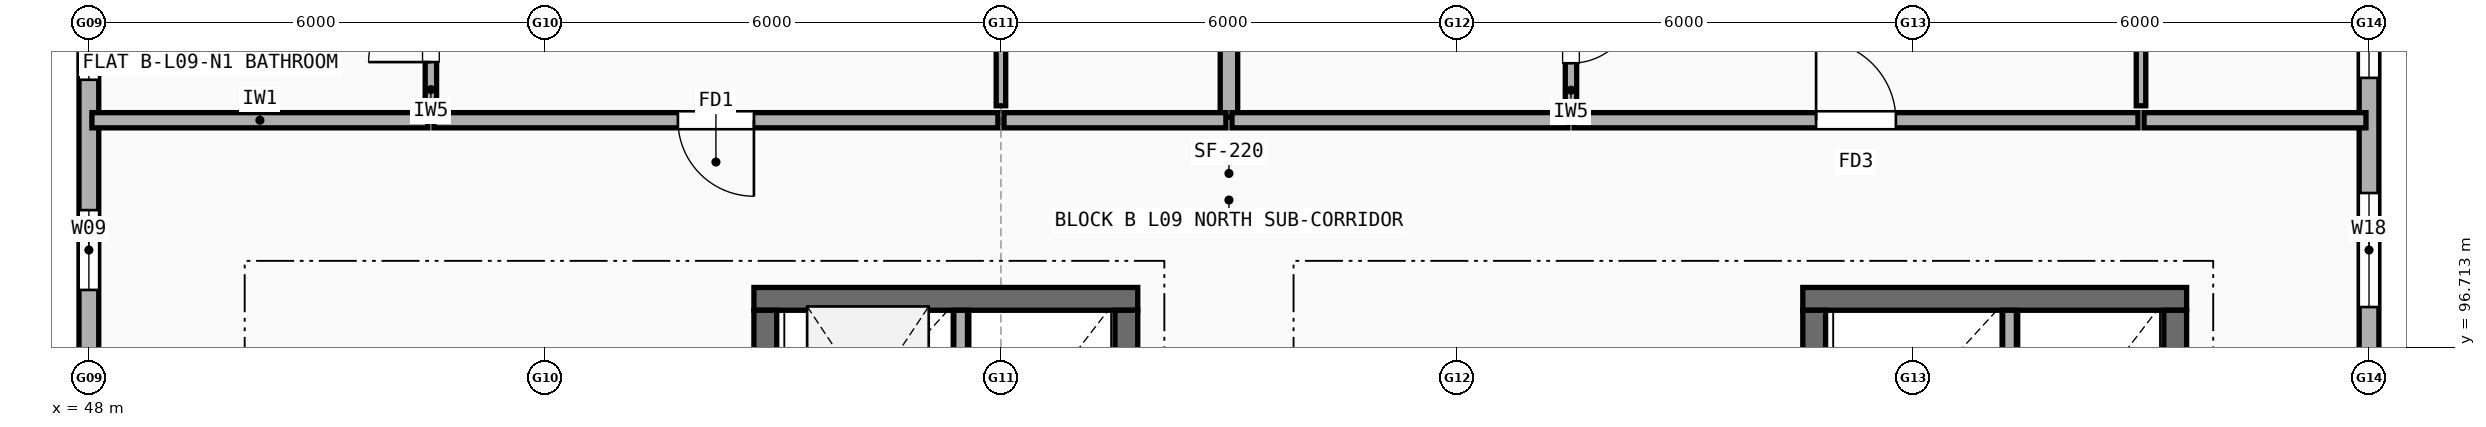
"""IFC4 building model, lengths in metres.
Left out: names, types, materials, properties, quantities, classifications, styles, units other than length and angle.
Written with IfcOpenShell. Run it as: python <this file> out.ifc"""

import sys

from ifc_helpers import new_model, si_unit, direction, frame, frame_2d, origin, place, context, subcontext, project, spatial, rectangle, extrude, element, fill, save


model = new_model("IFC4")
c1 = context("Model", 3, precision=1e-05, world=origin(), true_north=direction((0.0, 1.0)))
c2 = subcontext(c1, "Body", "Model", "MODEL_VIEW")
j1 = project(units=[si_unit("LENGTHUNIT", "METRE"), si_unit("PLANEANGLEUNIT", "RADIAN")], contexts=[c1])
p1 = place(None, origin())
s1 = spatial("IfcSite", under=j1, at=p1, CompositionType="ELEMENT")
p2 = place(p1, origin())
s2 = spatial("IfcBuilding", under=s1, at=p2, CompositionType="ELEMENT")
p3 = place(p2, frame((0.0, 0.0, 30.1)))
s3 = spatial("IfcBuildingStorey", under=s2, at=p3, CompositionType="ELEMENT", Elevation=30.1)
p4 = place(p3, frame((78.0, 96.325, 0.0), z_axis=(0.0, 0.0, 1.0), x_axis=(0.0, 1.0, 0.0)))
e1 = element("IfcWall", 1, at=p4, inside=s3, PredefinedType="STANDARD", context=c2, shape_type="SweptSolid", body=[
    extrude(rectangle(XDim=5.35, YDim=0.26, at=frame_2d((2.675, 0.0))), origin(), (0.0, 0.0, 1.0), 2.467),
])
p5 = place(p4, frame((0.917, 0.0, 0.9)))
e2 = element("IfcOpeningElement", 2, at=p5, cuts=e1, PredefinedType="OPENING", context=c2, shape_type="SweptSolid", body=[
    extrude(rectangle(XDim=1.5, YDim=1.4, at=frame_2d((0.75, 0.7))), frame((0.0, 0.14, 0.0), z_axis=(0.0, -1.0, 0.0), x_axis=(1.0, 0.0, 0.0)), (0.0, 0.0, 1.0), 0.28),
])
p6 = place(p4, frame((3.933, 0.0, 0.9)))
e3 = element("IfcOpeningElement", 3, at=p6, cuts=e1, PredefinedType="OPENING", context=c2, shape_type="SweptSolid", body=[
    extrude(rectangle(XDim=0.9, YDim=1.3, at=frame_2d((0.45, 0.65))), frame((0.0, 0.14, 0.0), z_axis=(0.0, -1.0, 0.0), x_axis=(1.0, 0.0, 0.0)), (0.0, 0.0, 1.0), 0.28),
])
p7 = place(p3, frame((48.0, 101.675, 0.0), z_axis=(0.0, 0.0, 1.0), x_axis=(0.0, -1.0, 0.0)))
e4 = element("IfcWall", 4, at=p7, inside=s3, PredefinedType="STANDARD", context=c2, shape_type="SweptSolid", body=[
    extrude(rectangle(XDim=5.35, YDim=0.26, at=frame_2d((2.675, 0.0))), origin(), (0.0, 0.0, 1.0), 2.467),
])
p8 = place(p7, frame((0.492, 0.0, 0.9)))
e5 = element("IfcOpeningElement", 5, at=p8, cuts=e4, PredefinedType="OPENING", context=c2, shape_type="SweptSolid", body=[
    extrude(rectangle(XDim=0.95, YDim=1.35, at=frame_2d((0.475, 0.675))), frame((0.0, 0.14, 0.0), z_axis=(0.0, -1.0, 0.0), x_axis=(1.0, 0.0, 0.0)), (0.0, 0.0, 1.0), 0.28),
])
p9 = place(p7, frame((3.157, 0.0, 0.9)))
e6 = element("IfcOpeningElement", 6, at=p9, cuts=e4, PredefinedType="OPENING", context=c2, shape_type="SweptSolid", body=[
    extrude(rectangle(XDim=1.05, YDim=1.35, at=frame_2d((0.525, 0.675))), frame((0.0, 0.14, 0.0), z_axis=(0.0, -1.0, 0.0), x_axis=(1.0, 0.0, 0.0)), (0.0, 0.0, 1.0), 0.28),
])
p10 = place(p3, frame((61.8, 97.35, 0.0), z_axis=(0.0, 0.0, 1.0), x_axis=(-1.0, 0.0, 0.0)))
e7 = element("IfcWall", 7, at=p10, inside=s3, PredefinedType="SHEAR", context=c2, shape_type="SweptSolid", body=[
    extrude(rectangle(XDim=5.05, YDim=0.3, at=frame_2d((2.525, 0.0))), origin(), (0.0, 0.0, 1.0), 2.985),
])
p11 = place(p3, frame((61.65, 90.75, 0.0), z_axis=(0.0, 0.0, 1.0), x_axis=(0.0, 1.0, 0.0)))
e8 = element("IfcWall", 8, at=p11, inside=s3, PredefinedType="SHEAR", context=c2, shape_type="SweptSolid", body=[
    extrude(rectangle(XDim=6.45, YDim=0.3, at=frame_2d((3.225, 0.0))), origin(), (0.0, 0.0, 1.0), 2.985),
])
p12 = place(p3, frame((56.9, 93.75, 0.0), z_axis=(0.0, 0.0, 1.0), x_axis=(0.0, 1.0, 0.0)))
e9 = element("IfcWall", 9, at=p12, inside=s3, PredefinedType="SHEAR", context=c2, shape_type="SweptSolid", body=[
    extrude(rectangle(XDim=3.45, YDim=0.3, at=frame_2d((1.725, 0.0))), origin(), (0.0, 0.0, 1.0), 2.985),
])
p13 = place(p3, frame((59.47, 94.94, 0.0), z_axis=(0.0, 0.0, 1.0), x_axis=(0.0, 1.0, 0.0)))
e10 = element("IfcWall", 10, at=p13, inside=s3, PredefinedType="SOLIDWALL", context=c2, shape_type="SweptSolid", body=[
    extrude(rectangle(XDim=2.26, YDim=0.18, at=frame_2d((1.13, 0.0))), origin(), (0.0, 0.0, 1.0), 2.985),
])
p14 = place(p3, frame((75.6, 97.35, 0.0), z_axis=(0.0, 0.0, 1.0), x_axis=(-1.0, 0.0, 0.0)))
e11 = element("IfcWall", 11, at=p14, inside=s3, PredefinedType="SHEAR", context=c2, shape_type="SweptSolid", body=[
    extrude(rectangle(XDim=5.05, YDim=0.3, at=frame_2d((2.525, 0.0))), origin(), (0.0, 0.0, 1.0), 2.985),
])
p15 = place(p3, frame((75.45, 90.75, 0.0), z_axis=(0.0, 0.0, 1.0), x_axis=(0.0, 1.0, 0.0)))
e12 = element("IfcWall", 12, at=p15, inside=s3, PredefinedType="SHEAR", context=c2, shape_type="SweptSolid", body=[
    extrude(rectangle(XDim=6.45, YDim=0.3, at=frame_2d((3.225, 0.0))), origin(), (0.0, 0.0, 1.0), 2.985),
])
p16 = place(p3, frame((70.7, 93.65, 0.0), z_axis=(0.0, 0.0, 1.0), x_axis=(0.0, 1.0, 0.0)))
e13 = element("IfcWall", 13, at=p16, inside=s3, PredefinedType="SHEAR", context=c2, shape_type="SweptSolid", body=[
    extrude(rectangle(XDim=3.55, YDim=0.3, at=frame_2d((1.775, 0.0))), origin(), (0.0, 0.0, 1.0), 2.985),
])
p17 = place(p3, frame((73.27, 94.94, 0.0), z_axis=(0.0, 0.0, 1.0), x_axis=(0.0, 1.0, 0.0)))
e14 = element("IfcWall", 14, at=p17, inside=s3, PredefinedType="SOLIDWALL", context=c2, shape_type="SweptSolid", body=[
    extrude(rectangle(XDim=2.26, YDim=0.18, at=frame_2d((1.13, 0.0))), origin(), (0.0, 0.0, 1.0), 2.985),
])
p18 = place(p3, frame((63.0, 99.74, 0.0), z_axis=(0.0, 0.0, 1.0), x_axis=(0.0, 1.0, 0.0)))
e15 = element("IfcWall", 15, at=p18, inside=s3, PredefinedType="SOLIDWALL", context=c2, shape_type="SweptSolid", body=[
    extrude(rectangle(XDim=13.87, YDim=0.23, at=frame_2d((6.935, 0.0))), origin(), (0.0, 0.0, 1.0), 2.467),
])
p19 = place(p3, frame((48.04, 99.7, 0.0), z_axis=(0.0, 0.0, 1.0), x_axis=(1.0, 0.0, 0.0)))
e16 = element("IfcWall", 16, at=p19, inside=s3, PredefinedType="SOLIDWALL", context=c2, shape_type="SweptSolid", body=[
    extrude(rectangle(XDim=4.42, YDim=0.2, at=frame_2d((2.21, 0.0))), origin(), (0.0, 0.0, 1.0), 2.467),
])
p20 = place(p3, frame((52.54, 99.7, 0.0), z_axis=(0.0, 0.0, 1.0), x_axis=(1.0, 0.0, 0.0)))
e17 = element("IfcWall", 17, at=p20, inside=s3, PredefinedType="SOLIDWALL", context=c2, shape_type="SweptSolid", body=[
    extrude(rectangle(XDim=7.42, YDim=0.2, at=frame_2d((3.71, 0.0))), origin(), (0.0, 0.0, 1.0), 2.508),
])
p21 = place(p20, frame((3.21, 0.0, 0.0)))
e18 = element("IfcOpeningElement", 18, at=p21, cuts=e17, PredefinedType="OPENING", context=c2, shape_type="SweptSolid", body=[
    extrude(rectangle(XDim=1.0, YDim=2.15, at=frame_2d((0.5, 1.075))), frame((0.0, 0.11, 0.0), z_axis=(0.0, -1.0, 0.0), x_axis=(1.0, 0.0, 0.0)), (0.0, 0.0, 1.0), 0.22),
])
p22 = place(p3, frame((52.5, 99.89, 0.0), z_axis=(0.0, 0.0, 1.0), x_axis=(0.0, 1.0, 0.0)))
e19 = element("IfcWall", 19, at=p22, inside=s3, PredefinedType="PARTITIONING", context=c2, shape_type="SweptSolid", body=[
    extrude(rectangle(XDim=1.97, YDim=0.15, at=frame_2d((0.985, 0.0))), origin(), (0.0, 0.0, 1.0), 2.985),
])
p23 = place(p22, frame((0.575, 0.0, 0.0)))
e20 = element("IfcOpeningElement", 20, at=p23, cuts=e19, PredefinedType="OPENING", context=c2, shape_type="SweptSolid", body=[
    extrude(rectangle(XDim=0.82, YDim=2.08, at=frame_2d((0.41, 1.04))), frame((0.0, 0.085, 0.0), z_axis=(0.0, -1.0, 0.0), x_axis=(1.0, 0.0, 0.0)), (0.0, 0.0, 1.0), 0.17),
])
p24 = place(p3, frame((60.04, 99.7, 0.0), z_axis=(0.0, 0.0, 1.0), x_axis=(1.0, 0.0, 0.0)))
e21 = element("IfcWall", 21, at=p24, inside=s3, PredefinedType="SOLIDWALL", context=c2, shape_type="SweptSolid", body=[
    extrude(rectangle(XDim=2.92, YDim=0.2, at=frame_2d((1.46, 0.0))), origin(), (0.0, 0.0, 1.0), 2.508),
])
p25 = place(p3, frame((60.0, 99.89, 0.0), z_axis=(0.0, 0.0, 1.0), x_axis=(0.0, 1.0, 0.0)))
e22 = element("IfcWall", 22, at=p25, inside=s3, PredefinedType="PARTITIONING", context=c2, shape_type="SweptSolid", body=[
    extrude(rectangle(XDim=13.6, YDim=0.125, at=frame_2d((6.8, 0.0))), origin(), (0.0, 0.0, 1.0), 2.508),
])
p26 = place(p25, frame((6.65, 0.0, 0.0)))
e23 = element("IfcOpeningElement", 23, at=p26, cuts=e22, PredefinedType="OPENING", context=c2, shape_type="SweptSolid", body=[
    extrude(rectangle(XDim=0.9, YDim=2.1, at=frame_2d((0.45, 1.05))), frame((0.0, 0.073, 0.0), z_axis=(0.0, -1.0, 0.0), x_axis=(1.0, 0.0, 0.0)), (0.0, 0.0, 1.0), 0.145),
])
p27 = place(p3, frame((63.04, 99.7, 0.0), z_axis=(0.0, 0.0, 1.0), x_axis=(1.0, 0.0, 0.0)))
e24 = element("IfcWall", 24, at=p27, inside=s3, PredefinedType="SOLIDWALL", context=c2, shape_type="SweptSolid", body=[
    extrude(rectangle(XDim=4.42, YDim=0.2, at=frame_2d((2.21, 0.0))), origin(), (0.0, 0.0, 1.0), 2.985),
])
p28 = place(p3, frame((67.54, 99.7, 0.0), z_axis=(0.0, 0.0, 1.0), x_axis=(1.0, 0.0, 0.0)))
e25 = element("IfcWall", 25, at=p28, inside=s3, PredefinedType="SOLIDWALL", context=c2, shape_type="SweptSolid", body=[
    extrude(rectangle(XDim=7.42, YDim=0.2, at=frame_2d((3.71, 0.0))), origin(), (0.0, 0.0, 1.0), 2.985),
])
p29 = place(p28, frame((3.185, 0.0, 0.0)))
e26 = element("IfcOpeningElement", 26, at=p29, cuts=e25, PredefinedType="OPENING", context=c2, shape_type="SweptSolid", body=[
    extrude(rectangle(XDim=1.05, YDim=2.15, at=frame_2d((0.525, 1.075))), frame((0.0, 0.11, 0.0), z_axis=(0.0, -1.0, 0.0), x_axis=(1.0, 0.0, 0.0)), (0.0, 0.0, 1.0), 0.22),
])
p30 = place(p3, frame((67.5, 99.89, 0.0), z_axis=(0.0, 0.0, 1.0), x_axis=(0.0, 1.0, 0.0)))
e27 = element("IfcWall", 27, at=p30, inside=s3, PredefinedType="PARTITIONING", context=c2, shape_type="SweptSolid", body=[
    extrude(rectangle(XDim=1.97, YDim=0.15, at=frame_2d((0.985, 0.0))), origin(), (0.0, 0.0, 1.0), 2.985),
])
p31 = place(p30, frame((0.56, 0.0, 0.0)))
e28 = element("IfcOpeningElement", 28, at=p31, cuts=e27, PredefinedType="OPENING", context=c2, shape_type="SweptSolid", body=[
    extrude(rectangle(XDim=0.85, YDim=2.1, at=frame_2d((0.425, 1.05))), frame((0.0, 0.085, 0.0), z_axis=(0.0, -1.0, 0.0), x_axis=(1.0, 0.0, 0.0)), (0.0, 0.0, 1.0), 0.17),
])
p32 = place(p3, frame((75.04, 99.7, 0.0), z_axis=(0.0, 0.0, 1.0), x_axis=(1.0, 0.0, 0.0)))
e29 = element("IfcWall", 29, at=p32, inside=s3, PredefinedType="SOLIDWALL", context=c2, shape_type="SweptSolid", body=[
    extrude(rectangle(XDim=2.92, YDim=0.2, at=frame_2d((1.46, 0.0))), origin(), (0.0, 0.0, 1.0), 2.467),
])
p33 = place(p3, frame((75.0, 99.89, 0.0), z_axis=(0.0, 0.0, 1.0), x_axis=(0.0, 1.0, 0.0)))
e30 = element("IfcWall", 30, at=p33, inside=s3, PredefinedType="PARTITIONING", context=c2, shape_type="SweptSolid", body=[
    extrude(rectangle(XDim=13.92, YDim=0.125, at=frame_2d((6.96, 0.0))), origin(), (0.0, 0.0, 1.0), 2.467),
])
p34 = place(p33, frame((6.65, 0.0, 0.0)))
e31 = element("IfcOpeningElement", 31, at=p34, cuts=e30, PredefinedType="OPENING", context=c2, shape_type="SweptSolid", body=[
    extrude(rectangle(XDim=0.88, YDim=2.1, at=frame_2d((0.44, 1.05))), frame((0.0, 0.073, 0.0), z_axis=(0.0, -1.0, 0.0), x_axis=(1.0, 0.0, 0.0)), (0.0, 0.0, 1.0), 0.145),
])
p35 = place(p5, origin())
e32 = element("IfcWindow", 32, at=p35, inside=s3, PartitioningType="SINGLE_PANEL", PredefinedType="WINDOW", context=c2, shape_type="SweptSolid", body=[
    extrude(rectangle(XDim=1.5, YDim=1.4, at=frame_2d((0.75, 0.7))), frame((0.0, 0.03, 0.0), z_axis=(0.0, -1.0, 0.0), x_axis=(1.0, 0.0, 0.0)), (0.0, 0.0, 1.0), 0.06),
])
fill(e2, e32)
p36 = place(p6, origin())
e33 = element("IfcWindow", 33, at=p36, inside=s3, PartitioningType="SINGLE_PANEL", PredefinedType="WINDOW", context=c2, shape_type="SweptSolid", body=[
    extrude(rectangle(XDim=0.9, YDim=1.3, at=frame_2d((0.45, 0.65))), frame((0.0, 0.03, 0.0), z_axis=(0.0, -1.0, 0.0), x_axis=(1.0, 0.0, 0.0)), (0.0, 0.0, 1.0), 0.06),
])
fill(e3, e33)
p37 = place(p8, origin())
e34 = element("IfcWindow", 34, at=p37, inside=s3, PartitioningType="SINGLE_PANEL", PredefinedType="WINDOW", context=c2, shape_type="SweptSolid", body=[
    extrude(rectangle(XDim=0.95, YDim=1.35, at=frame_2d((0.475, 0.675))), frame((0.0, 0.03, 0.0), z_axis=(0.0, -1.0, 0.0), x_axis=(1.0, 0.0, 0.0)), (0.0, 0.0, 1.0), 0.06),
])
fill(e5, e34)
p38 = place(p9, origin())
e35 = element("IfcWindow", 35, at=p38, inside=s3, PartitioningType="SINGLE_PANEL", PredefinedType="WINDOW", context=c2, shape_type="SweptSolid", body=[
    extrude(rectangle(XDim=1.05, YDim=1.35, at=frame_2d((0.525, 0.675))), frame((0.0, 0.03, 0.0), z_axis=(0.0, -1.0, 0.0), x_axis=(1.0, 0.0, 0.0)), (0.0, 0.0, 1.0), 0.06),
])
fill(e6, e35)
p39 = place(p21, origin())
e36 = element("IfcDoor", 36, at=p39, inside=s3, OperationType="SINGLE_SWING_RIGHT", PredefinedType="DOOR", context=c2, shape_type="SweptSolid", body=[
    extrude(rectangle(XDim=1.0, YDim=2.15, at=frame_2d((0.5, 1.075))), frame((0.0, 0.025, 0.0), z_axis=(0.0, -1.0, 0.0), x_axis=(1.0, 0.0, 0.0)), (0.0, 0.0, 1.0), 0.05),
])
fill(e18, e36)
p40 = place(p23, origin())
e37 = element("IfcDoor", 37, at=p40, inside=s3, OperationType="SINGLE_SWING_LEFT", PredefinedType="DOOR", context=c2, shape_type="SweptSolid", body=[
    extrude(rectangle(XDim=0.82, YDim=2.08, at=frame_2d((0.41, 1.04))), frame((0.0, 0.025, 0.0), z_axis=(0.0, -1.0, 0.0), x_axis=(1.0, 0.0, 0.0)), (0.0, 0.0, 1.0), 0.05),
])
fill(e20, e37)
p41 = place(p29, origin())
e38 = element("IfcDoor", 38, at=p41, inside=s3, OperationType="SINGLE_SWING_LEFT", PredefinedType="DOOR", context=c2, shape_type="SweptSolid", body=[
    extrude(rectangle(XDim=1.05, YDim=2.15, at=frame_2d((0.525, 1.075))), frame((0.0, 0.025, 0.0), z_axis=(0.0, -1.0, 0.0), x_axis=(1.0, 0.0, 0.0)), (0.0, 0.0, 1.0), 0.05),
])
fill(e26, e38)
p42 = place(p31, origin())
e39 = element("IfcDoor", 39, at=p42, inside=s3, OperationType="SINGLE_SWING_RIGHT", PredefinedType="DOOR", context=c2, shape_type="SweptSolid", body=[
    extrude(rectangle(XDim=0.85, YDim=2.1, at=frame_2d((0.425, 1.05))), frame((0.0, 0.025, 0.0), z_axis=(0.0, -1.0, 0.0), x_axis=(1.0, 0.0, 0.0)), (0.0, 0.0, 1.0), 0.05),
])
fill(e28, e39)
save(model, sys.argv[1])
